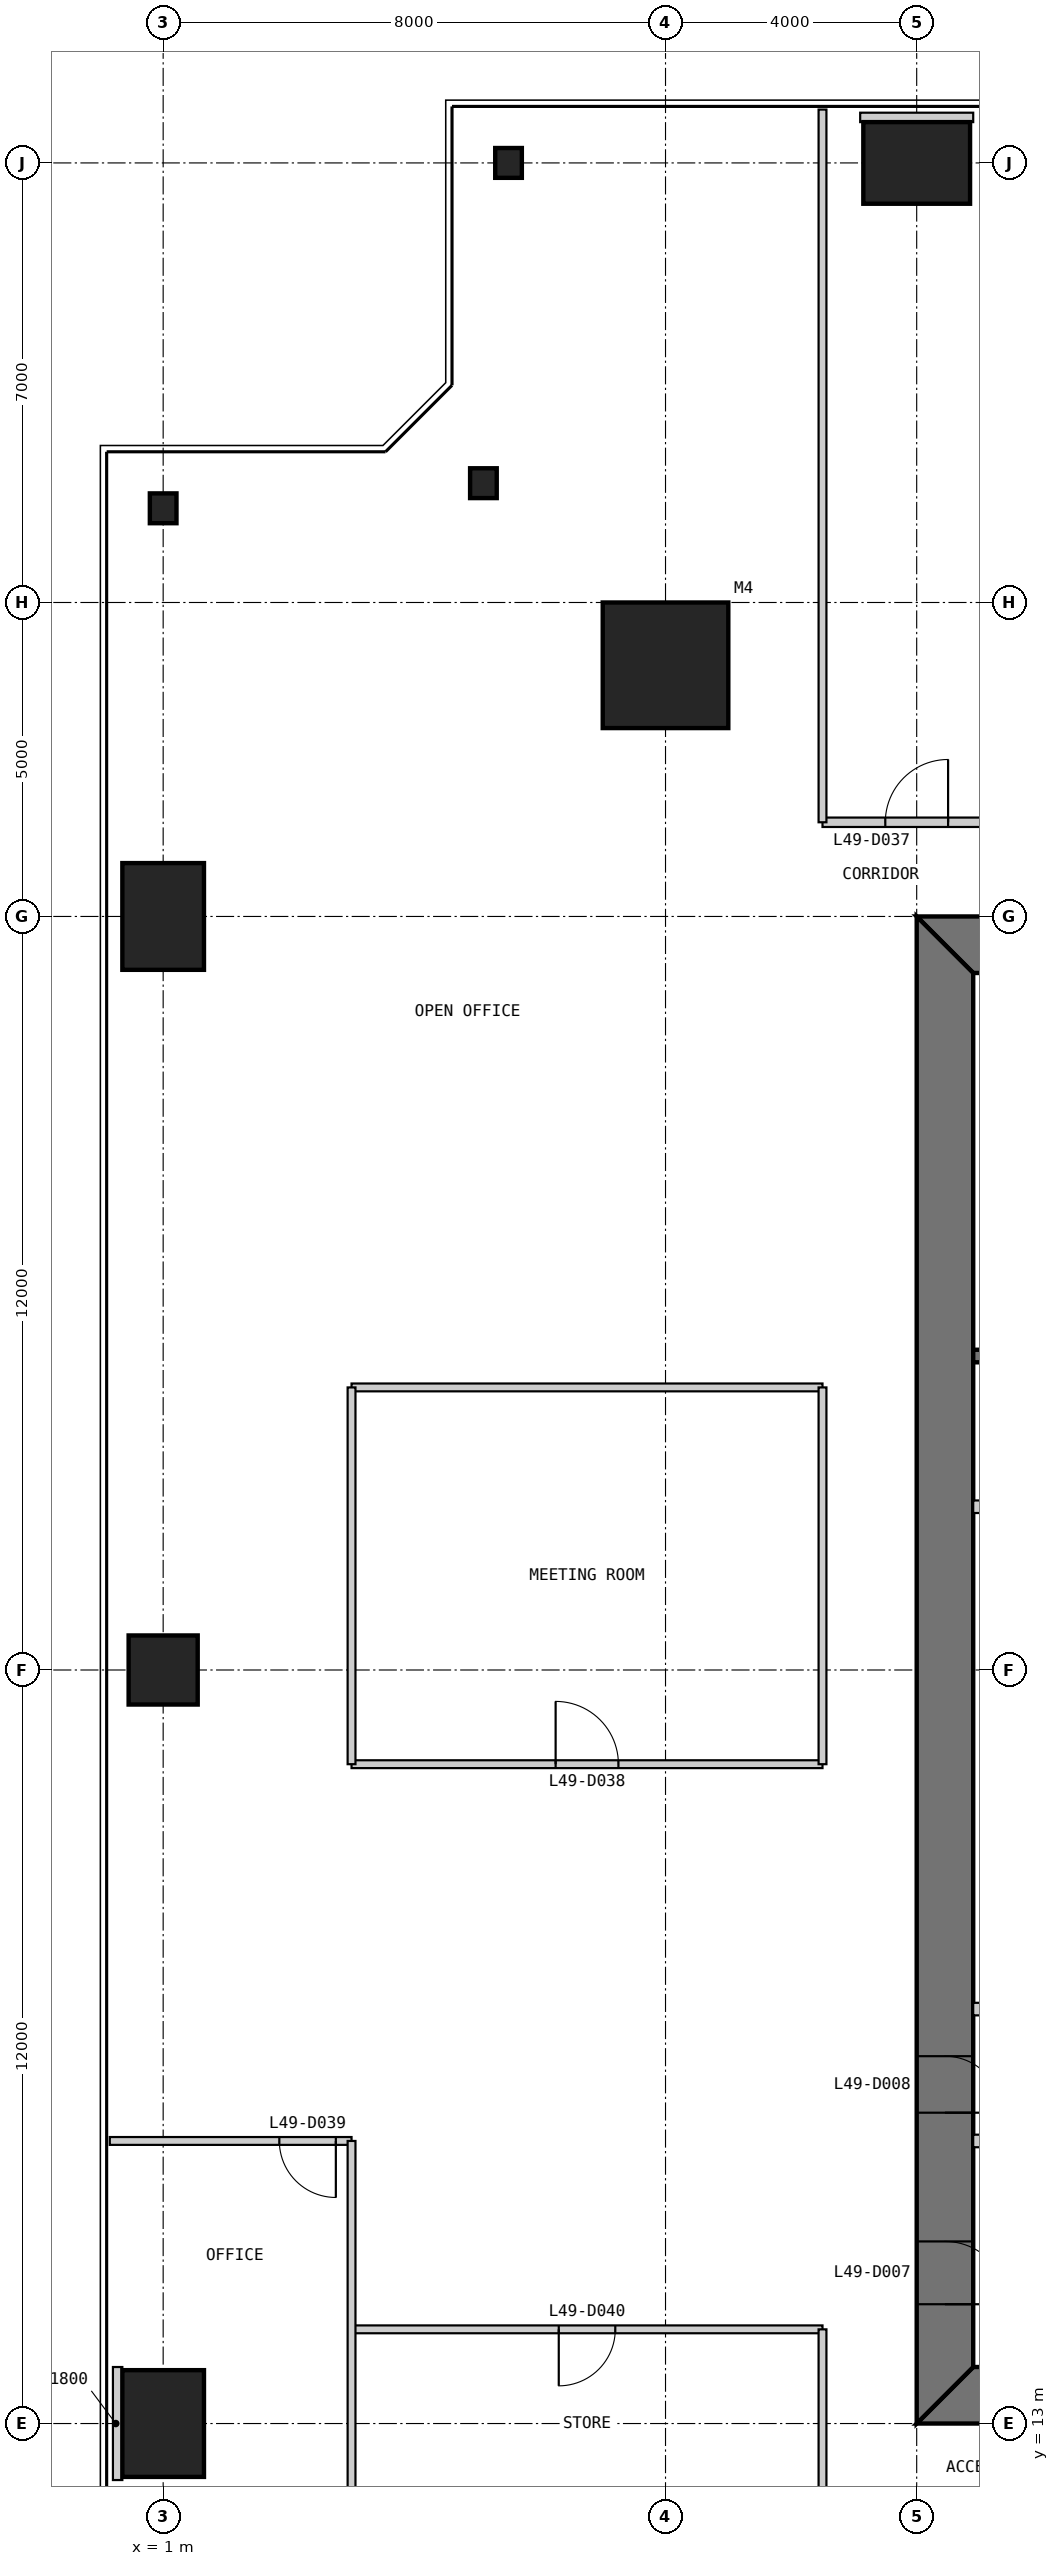
"""IFC4 building model, lengths in metres.
Left out: names, types, materials, properties, quantities, classifications, styles, units other than length and angle.
Written with IfcOpenShell. Run it as: python <this file> out.ifc"""

import sys

from ifc_helpers import new_model, si_unit, direction, frame, frame_2d, origin, origin_2d, place, context, subcontext, project, spatial, polyline, rectangle, i_section, outline, extrude, element, fill, save


model = new_model("IFC4")
c1 = context("Model", 3, precision=1e-05, world=origin(), true_north=direction((0.0, 1.0)))
c2 = subcontext(c1, "Body", "Model", "MODEL_VIEW")
j1 = project(units=[si_unit("LENGTHUNIT", "METRE"), si_unit("PLANEANGLEUNIT", "RADIAN")], contexts=[c1])
p1 = place(None, origin())
s1 = spatial("IfcSite", under=j1, at=p1, CompositionType="ELEMENT")
p2 = place(p1, origin())
s2 = spatial("IfcBuilding", under=s1, at=p2, CompositionType="ELEMENT")
p3 = place(p2, frame((0.0, 0.0, 209.8)))
s3 = spatial("IfcBuildingStorey", under=s2, at=p3, CompositionType="ELEMENT", Elevation=209.8)
p4 = place(p3, frame((9.0, 41.0, 0.0), z_axis=(0.0, 0.0, 1.0), x_axis=(1.0, 0.0, 0.0)))
e1 = element("IfcColumn", 1, at=p4, inside=s3, PredefinedType="COLUMN", context=c2, shape_type="SweptSolid", body=[
    extrude(rectangle(XDim=2.0, YDim=2.0, at=origin_2d()), origin(), (0.0, 0.0, 1.0), 4.0),
])
p5 = place(p3, frame((13.0, 49.0, 0.0), z_axis=(0.0, 0.0, 1.0), x_axis=(1.0, 0.0, 0.0)))
e2 = element("IfcColumn", 2, at=p5, inside=s3, PredefinedType="COLUMN", context=c2, shape_type="SweptSolid", body=[
    extrude(rectangle(XDim=1.7, YDim=1.3, at=origin_2d()), origin(), (0.0, 0.0, 1.0), 4.0),
])
for number, where, z_axis, x_axis in (
    (3, (6.5, 49.0, 0.0), (0.0, 0.0, 1.0), (1.0, 0.0, 0.0)),
    (4, (6.1, 43.9, 0.0), (0.0, 0.0, 1.0), (1.0, 0.0, 0.0)),
    (5, (1.0, 43.5, 0.0), (0.0, 0.0, 1.0), (1.0, 0.0, 0.0)),
):
    element("IfcColumn", number, at=place(p3, frame(where, z_axis=z_axis, x_axis=x_axis)), inside=s3, PredefinedType="COLUMN", context=c2, shape_type="SweptSolid", body=[
        extrude(i_section(OverallWidth=0.424, OverallDepth=0.475, WebThickness=0.048, FlangeThickness=0.077, at=origin_2d()), origin(), (0.0, 0.0, 1.0), 4.0),
    ])
p6 = place(p3, frame((1.0, 37.0, 0.0), z_axis=(0.0, 0.0, 1.0), x_axis=(1.0, 0.0, 0.0)))
e6 = element("IfcColumn", 6, at=p6, inside=s3, PredefinedType="COLUMN", context=c2, shape_type="SweptSolid", body=[
    extrude(rectangle(XDim=1.3, YDim=1.7, at=origin_2d()), origin(), (0.0, 0.0, 1.0), 4.0),
])
p7 = place(p3, frame((1.0, 25.0, 0.0), z_axis=(0.0, 0.0, 1.0), x_axis=(1.0, 0.0, 0.0)))
e7 = element("IfcColumn", 7, at=p7, inside=s3, PredefinedType="COLUMN", context=c2, shape_type="SweptSolid", body=[
    extrude(rectangle(XDim=1.1, YDim=1.1, at=origin_2d()), origin(), (0.0, 0.0, 1.0), 4.0),
])
p8 = place(p3, frame((1.0, 13.0, 0.0), z_axis=(0.0, 0.0, 1.0), x_axis=(1.0, 0.0, 0.0)))
e8 = element("IfcColumn", 8, at=p8, inside=s3, PredefinedType="COLUMN", context=c2, shape_type="SweptSolid", body=[
    extrude(rectangle(XDim=1.3, YDim=1.7, at=origin_2d()), origin(), (0.0, 0.0, 1.0), 4.0),
])
p9 = place(p3, frame((13.0, 13.45, 0.0), z_axis=(0.0, 0.0, 1.0), x_axis=(1.0, 0.0, 0.0)))
e9 = element("IfcWall", 9, at=p9, inside=s3, PredefinedType="SHEAR", context=c2, shape_type="SweptSolid", body=[
    extrude(outline(polyline([(0.0, -0.45), (24.0, -0.45), (23.1, 0.45), (0.9, 0.45), (0.0, -0.45)])), origin(), (0.0, 0.0, 1.0), 4.0),
])
p10 = place(p9, frame((4.9, 0.0, 0.0)))
e10 = element("IfcOpeningElement", 10, at=p10, cuts=e9, PredefinedType="OPENING", context=c2, shape_type="SweptSolid", body=[
    extrude(rectangle(XDim=1.0, YDim=2.2, at=frame_2d((0.5, 1.1))), frame((0.0, 0.46, 0.0), z_axis=(0.0, -1.0, 0.0), x_axis=(1.0, 0.0, 0.0)), (0.0, 0.0, 1.0), 0.92),
])
p11 = place(p9, frame((8.9, 0.0, 0.0)))
e11 = element("IfcOpeningElement", 11, at=p11, cuts=e9, PredefinedType="OPENING", context=c2, shape_type="SweptSolid", body=[
    extrude(rectangle(XDim=1.1, YDim=2.2, at=frame_2d((0.55, 1.1))), frame((0.0, 0.46, 0.0), z_axis=(0.0, -1.0, 0.0), x_axis=(1.0, 0.0, 0.0)), (0.0, 0.0, 1.0), 0.92),
])
p12 = place(p9, frame((15.05, 0.0, 0.0)))
e12 = element("IfcOpeningElement", 12, at=p12, cuts=e9, PredefinedType="OPENING", context=c2, shape_type="SweptSolid", body=[
    extrude(rectangle(XDim=0.9, YDim=2.2, at=frame_2d((0.45, 1.1))), frame((0.0, 0.46, 0.0), z_axis=(0.0, -1.0, 0.0), x_axis=(1.0, 0.0, 0.0)), (0.0, 0.0, 1.0), 0.92),
])
p13 = place(p9, frame((17.9, 0.0, 0.0)))
e13 = element("IfcOpeningElement", 13, at=p13, cuts=e9, PredefinedType="OPENING", context=c2, shape_type="SweptSolid", body=[
    extrude(rectangle(XDim=1.0, YDim=2.2, at=frame_2d((0.5, 1.1))), frame((0.0, 0.46, 0.0), z_axis=(0.0, -1.0, 0.0), x_axis=(1.0, 0.0, 0.0)), (0.0, 0.0, 1.0), 0.92),
])
p14 = place(p9, frame((21.4, 0.0, 0.0)))
e14 = element("IfcOpeningElement", 14, at=p14, cuts=e9, PredefinedType="OPENING", context=c2, shape_type="SweptSolid", body=[
    extrude(rectangle(XDim=1.0, YDim=2.2, at=frame_2d((0.5, 1.1))), frame((0.0, 0.46, 0.0), z_axis=(0.0, -1.0, 0.0), x_axis=(1.0, 0.0, 0.0)), (0.0, 0.0, 1.0), 0.92),
])
p15 = place(p3, frame((37.0, 36.55, 0.0), z_axis=(0.0, 0.0, 1.0), x_axis=(-1.0, 0.0, 0.0)))
e15 = element("IfcWall", 15, at=p15, inside=s3, PredefinedType="SHEAR", context=c2, shape_type="SweptSolid", body=[
    extrude(outline(polyline([(0.0, -0.45), (24.0, -0.45), (23.1, 0.45), (0.9, 0.45), (0.0, -0.45)])), origin(), (0.0, 0.0, 1.0), 4.0),
])
p16 = place(p15, frame((4.9, 0.0, 0.0)))
e16 = element("IfcOpeningElement", 16, at=p16, cuts=e15, PredefinedType="OPENING", context=c2, shape_type="SweptSolid", body=[
    extrude(rectangle(XDim=1.0, YDim=2.2, at=frame_2d((0.5, 1.1))), frame((0.0, 0.46, 0.0), z_axis=(0.0, -1.0, 0.0), x_axis=(1.0, 0.0, 0.0)), (0.0, 0.0, 1.0), 0.92),
])
p17 = place(p15, frame((8.9, 0.0, 0.0)))
e17 = element("IfcOpeningElement", 17, at=p17, cuts=e15, PredefinedType="OPENING", context=c2, shape_type="SweptSolid", body=[
    extrude(rectangle(XDim=1.1, YDim=2.2, at=frame_2d((0.55, 1.1))), frame((0.0, 0.46, 0.0), z_axis=(0.0, -1.0, 0.0), x_axis=(1.0, 0.0, 0.0)), (0.0, 0.0, 1.0), 0.92),
])
p18 = place(p15, frame((15.05, 0.0, 0.0)))
e18 = element("IfcOpeningElement", 18, at=p18, cuts=e15, PredefinedType="OPENING", context=c2, shape_type="SweptSolid", body=[
    extrude(rectangle(XDim=0.9, YDim=2.2, at=frame_2d((0.45, 1.1))), frame((0.0, 0.46, 0.0), z_axis=(0.0, -1.0, 0.0), x_axis=(1.0, 0.0, 0.0)), (0.0, 0.0, 1.0), 0.92),
])
p19 = place(p15, frame((17.9, 0.0, 0.0)))
e19 = element("IfcOpeningElement", 19, at=p19, cuts=e15, PredefinedType="OPENING", context=c2, shape_type="SweptSolid", body=[
    extrude(rectangle(XDim=1.0, YDim=2.2, at=frame_2d((0.5, 1.1))), frame((0.0, 0.46, 0.0), z_axis=(0.0, -1.0, 0.0), x_axis=(1.0, 0.0, 0.0)), (0.0, 0.0, 1.0), 0.92),
])
p20 = place(p15, frame((21.4, 0.0, 0.0)))
e20 = element("IfcOpeningElement", 20, at=p20, cuts=e15, PredefinedType="OPENING", context=c2, shape_type="SweptSolid", body=[
    extrude(rectangle(XDim=1.0, YDim=2.2, at=frame_2d((0.5, 1.1))), frame((0.0, 0.46, 0.0), z_axis=(0.0, -1.0, 0.0), x_axis=(1.0, 0.0, 0.0)), (0.0, 0.0, 1.0), 0.92),
])
p21 = place(p3, frame((13.45, 36.1, 0.0), z_axis=(0.0, 0.0, 1.0), x_axis=(0.0, -1.0, 0.0)))
e21 = element("IfcWall", 21, at=p21, inside=s3, PredefinedType="SHEAR", context=c2, shape_type="SweptSolid", body=[
    extrude(outline(polyline([(-0.9, -0.45), (23.1, -0.45), (22.2, 0.45), (0.0, 0.45), (-0.9, -0.45)])), origin(), (0.0, 0.0, 1.0), 4.0),
])
p22 = place(p21, frame((20.2, 0.0, 0.0)))
e22 = element("IfcOpeningElement", 22, at=p22, cuts=e21, PredefinedType="OPENING", context=c2, shape_type="SweptSolid", body=[
    extrude(rectangle(XDim=1.0, YDim=2.2, at=frame_2d((0.5, 1.1))), frame((0.0, 0.46, 0.0), z_axis=(0.0, -1.0, 0.0), x_axis=(1.0, 0.0, 0.0)), (0.0, 0.0, 1.0), 0.92),
])
p23 = place(p21, frame((17.25, 0.0, 0.0)))
e23 = element("IfcOpeningElement", 23, at=p23, cuts=e21, PredefinedType="OPENING", context=c2, shape_type="SweptSolid", body=[
    extrude(rectangle(XDim=0.9, YDim=2.2, at=frame_2d((0.45, 1.1))), frame((0.0, 0.46, 0.0), z_axis=(0.0, -1.0, 0.0), x_axis=(1.0, 0.0, 0.0)), (0.0, 0.0, 1.0), 0.92),
])
for number, where, z_axis, x_axis in (
    (24, (13.9, 17.5, 0.0), (0.0, 0.0, 1.0), (1.0, 0.0, 0.0)),
    (25, (13.9, 19.6, 0.0), (0.0, 0.0, 1.0), (1.0, 0.0, 0.0)),
    (26, (13.9, 27.6, 0.0), (0.0, 0.0, 1.0), (1.0, 0.0, 0.0)),
):
    element("IfcWall", number, at=place(p3, frame(where, z_axis=z_axis, x_axis=x_axis)), inside=s3, PredefinedType="PARTITIONING", context=c2, shape_type="SweptSolid", body=[
        extrude(rectangle(XDim=2.8, YDim=0.2, at=frame_2d((1.4, 0.0))), origin(), (0.0, 0.0, 1.0), 3.8),
    ])
p24 = place(p3, frame((29.7, 30.0, 0.0), z_axis=(0.0, 0.0, 1.0), x_axis=(-1.0, 0.0, 0.0)))
e27 = element("IfcWall", 27, at=p24, inside=s3, PredefinedType="SOLIDWALL", context=c2, shape_type="SweptSolid", body=[
    extrude(rectangle(XDim=15.8, YDim=0.2, at=frame_2d((7.9, 0.0))), origin(), (0.0, 0.0, 1.0), 3.8),
])
p25 = place(p3, frame((38.5, 38.5, 0.0), z_axis=(0.0, 0.0, 1.0), x_axis=(-1.0, 0.0, 0.0)))
e28 = element("IfcWall", 28, at=p25, inside=s3, PredefinedType="PARTITIONING", context=c2, shape_type="SweptSolid", body=[
    extrude(rectangle(XDim=27.0, YDim=0.15, at=frame_2d((13.5, 0.0))), origin(), (0.0, 0.0, 1.0), 3.85),
])
p26 = place(p25, frame((13.0, 0.0, 0.0)))
e29 = element("IfcOpeningElement", 29, at=p26, cuts=e28, PredefinedType="OPENING", context=c2, shape_type="SweptSolid", body=[
    extrude(rectangle(XDim=1.0, YDim=2.2, at=frame_2d((0.5, 1.1))), frame((0.0, 0.085, 0.0), z_axis=(0.0, -1.0, 0.0), x_axis=(1.0, 0.0, 0.0)), (0.0, 0.0, 1.0), 0.17),
])
p27 = place(p25, frame((4.0, 0.0, 0.0)))
e30 = element("IfcOpeningElement", 30, at=p27, cuts=e28, PredefinedType="OPENING", context=c2, shape_type="SweptSolid", body=[
    extrude(rectangle(XDim=1.0, YDim=2.2, at=frame_2d((0.5, 1.1))), frame((0.0, 0.085, 0.0), z_axis=(0.0, -1.0, 0.0), x_axis=(1.0, 0.0, 0.0)), (0.0, 0.0, 1.0), 0.17),
])
p28 = place(p25, frame((22.0, 0.0, 0.0)))
e31 = element("IfcOpeningElement", 31, at=p28, cuts=e28, PredefinedType="OPENING", context=c2, shape_type="SweptSolid", body=[
    extrude(rectangle(XDim=1.0, YDim=2.2, at=frame_2d((0.5, 1.1))), frame((0.0, 0.085, 0.0), z_axis=(0.0, -1.0, 0.0), x_axis=(1.0, 0.0, 0.0)), (0.0, 0.0, 1.0), 0.17),
])
p29 = place(p25, frame((25.0, 0.0, 0.0)))
e32 = element("IfcOpeningElement", 32, at=p29, cuts=e28, PredefinedType="OPENING", context=c2, shape_type="SweptSolid", body=[
    extrude(rectangle(XDim=1.0, YDim=2.2, at=frame_2d((0.5, 1.1))), frame((0.0, 0.085, 0.0), z_axis=(0.0, -1.0, 0.0), x_axis=(1.0, 0.0, 0.0)), (0.0, 0.0, 1.0), 0.17),
])
p30 = place(p3, frame((11.5, 49.85, 0.0), z_axis=(0.0, 0.0, 1.0), x_axis=(0.0, -1.0, 0.0)))
e33 = element("IfcWall", 33, at=p30, inside=s3, PredefinedType="PARTITIONING", context=c2, shape_type="SweptSolid", body=[
    extrude(rectangle(XDim=11.35, YDim=0.125, at=frame_2d((5.675, 0.0))), origin(), (0.0, 0.0, 1.0), 3.85),
])
p31 = place(p3, frame((4.0, 29.5, 0.0), z_axis=(0.0, 0.0, 1.0), x_axis=(1.0, 0.0, 0.0)))
e34 = element("IfcWall", 34, at=p31, inside=s3, PredefinedType="PARTITIONING", context=c2, shape_type="SweptSolid", body=[
    extrude(rectangle(XDim=7.5, YDim=0.125, at=frame_2d((3.75, 0.0))), origin(), (0.0, 0.0, 1.0), 3.85),
])
p32 = place(p3, frame((4.0, 23.5, 0.0), z_axis=(0.0, 0.0, 1.0), x_axis=(1.0, 0.0, 0.0)))
e35 = element("IfcWall", 35, at=p32, inside=s3, PredefinedType="PARTITIONING", context=c2, shape_type="SweptSolid", body=[
    extrude(rectangle(XDim=7.5, YDim=0.125, at=frame_2d((3.75, 0.0))), origin(), (0.0, 0.0, 1.0), 3.85),
])
p33 = place(p32, frame((3.25, 0.0, 0.0)))
e36 = element("IfcOpeningElement", 36, at=p33, cuts=e35, PredefinedType="OPENING", context=c2, shape_type="SweptSolid", body=[
    extrude(rectangle(XDim=1.0, YDim=2.2, at=frame_2d((0.5, 1.1))), frame((0.0, 0.073, 0.0), z_axis=(0.0, -1.0, 0.0), x_axis=(1.0, 0.0, 0.0)), (0.0, 0.0, 1.0), 0.145),
])
p34 = place(p3, frame((0.15, 17.5, 0.0), z_axis=(0.0, 0.0, 1.0), x_axis=(1.0, 0.0, 0.0)))
e37 = element("IfcWall", 37, at=p34, inside=s3, PredefinedType="PARTITIONING", context=c2, shape_type="SweptSolid", body=[
    extrude(rectangle(XDim=3.85, YDim=0.125, at=frame_2d((1.925, 0.0))), origin(), (0.0, 0.0, 1.0), 3.85),
])
p35 = place(p34, frame((2.7, 0.0, 0.0)))
e38 = element("IfcOpeningElement", 38, at=p35, cuts=e37, PredefinedType="OPENING", context=c2, shape_type="SweptSolid", body=[
    extrude(rectangle(XDim=0.9, YDim=2.2, at=frame_2d((0.45, 1.1))), frame((0.0, 0.073, 0.0), z_axis=(0.0, -1.0, 0.0), x_axis=(1.0, 0.0, 0.0)), (0.0, 0.0, 1.0), 0.145),
])
p36 = place(p3, frame((4.0, 14.5, 0.0), z_axis=(0.0, 0.0, 1.0), x_axis=(1.0, 0.0, 0.0)))
e39 = element("IfcWall", 39, at=p36, inside=s3, PredefinedType="PARTITIONING", context=c2, shape_type="SweptSolid", body=[
    extrude(rectangle(XDim=7.5, YDim=0.125, at=frame_2d((3.75, 0.0))), origin(), (0.0, 0.0, 1.0), 3.85),
])
p37 = place(p36, frame((3.3, 0.0, 0.0)))
e40 = element("IfcOpeningElement", 40, at=p37, cuts=e39, PredefinedType="OPENING", context=c2, shape_type="SweptSolid", body=[
    extrude(rectangle(XDim=0.9, YDim=2.2, at=frame_2d((0.45, 1.1))), frame((0.0, 0.073, 0.0), z_axis=(0.0, -1.0, 0.0), x_axis=(1.0, 0.0, 0.0)), (0.0, 0.0, 1.0), 0.145),
])
for number, where, z_axis, x_axis in (
    (41, (4.0, 29.5, 0.0), (0.0, 0.0, 1.0), (0.0, -1.0, 0.0)),
    (42, (4.0, 17.5, 0.0), (0.0, 0.0, 1.0), (0.0, -1.0, 0.0)),
):
    element("IfcWall", number, at=place(p3, frame(where, z_axis=z_axis, x_axis=x_axis)), inside=s3, PredefinedType="PARTITIONING", context=c2, shape_type="SweptSolid", body=[
        extrude(rectangle(XDim=6.0, YDim=0.125, at=frame_2d((3.0, 0.0))), origin(), (0.0, 0.0, 1.0), 3.238),
    ])
p38 = place(p3, frame((11.5, 29.5, 0.0), z_axis=(0.0, 0.0, 1.0), x_axis=(0.0, -1.0, 0.0)))
e43 = element("IfcWall", 43, at=p38, inside=s3, PredefinedType="PARTITIONING", context=c2, shape_type="SweptSolid", body=[
    extrude(rectangle(XDim=6.0, YDim=0.125, at=frame_2d((3.0, 0.0))), origin(), (0.0, 0.0, 1.0), 3.85),
])
p39 = place(p3, frame((11.5, 14.5, 0.0), z_axis=(0.0, 0.0, 1.0), x_axis=(0.0, -1.0, 0.0)))
e44 = element("IfcWall", 44, at=p39, inside=s3, PredefinedType="PARTITIONING", context=c2, shape_type="SweptSolid", body=[
    extrude(rectangle(XDim=3.0, YDim=0.125, at=frame_2d((1.5, 0.0))), origin(), (0.0, 0.0, 1.0), 3.85),
])
for number, where, z_axis, x_axis in (
    (45, (13.0, 49.8, 0.0), (0.0, 0.0, 1.0), (0.0, -1.0, 0.0)),
    (46, (0.2, 13.0, 0.0), (0.0, 0.0, 1.0), (1.0, 0.0, 0.0)),
):
    element("IfcWall", number, at=place(p3, frame(where, z_axis=z_axis, x_axis=x_axis)), inside=s3, PredefinedType="PARTITIONING", context=c2, shape_type="SweptSolid", body=[
        extrude(rectangle(XDim=0.15, YDim=1.8, at=frame_2d((0.075, 0.0))), origin(), (0.0, 0.0, 1.0), 3.85),
    ])
p40 = place(p22, origin())
e47 = element("IfcDoor", 47, at=p40, inside=s3, OperationType="SINGLE_SWING_RIGHT", PredefinedType="DOOR", context=c2, shape_type="SweptSolid", body=[
    extrude(rectangle(XDim=1.0, YDim=2.2, at=frame_2d((0.5, 1.1))), frame((0.0, 0.025, 0.0), z_axis=(0.0, -1.0, 0.0), x_axis=(1.0, 0.0, 0.0)), (0.0, 0.0, 1.0), 0.05),
    extrude(outline(polyline([(0.0, 0.0), (0.04, 0.0), (0.04, 2.16), (0.96, 2.16), (0.96, 0.0), (1.0, 0.0), (1.0, 2.2), (0.0, 2.2), (0.0, 0.0)])), frame((0.0, 0.3, 0.0), z_axis=(0.0, -1.0, 0.0), x_axis=(1.0, 0.0, 0.0)), (0.0, 0.0, 1.0), 0.6),
])
fill(e22, e47)
p41 = place(p23, origin())
e48 = element("IfcDoor", 48, at=p41, inside=s3, OperationType="SINGLE_SWING_RIGHT", PredefinedType="DOOR", context=c2, shape_type="SweptSolid", body=[
    extrude(rectangle(XDim=0.9, YDim=2.2, at=frame_2d((0.45, 1.1))), frame((0.0, 0.025, 0.0), z_axis=(0.0, -1.0, 0.0), x_axis=(1.0, 0.0, 0.0)), (0.0, 0.0, 1.0), 0.05),
    extrude(outline(polyline([(0.0, 0.0), (0.04, 0.0), (0.04, 2.16), (0.86, 2.16), (0.86, 0.0), (0.9, 0.0), (0.9, 2.2), (0.0, 2.2), (0.0, 0.0)])), frame((0.0, 0.3, 0.0), z_axis=(0.0, -1.0, 0.0), x_axis=(1.0, 0.0, 0.0)), (0.0, 0.0, 1.0), 0.6),
])
fill(e23, e48)
p42 = place(p29, frame((1.0, 0.0, 0.0), z_axis=(0.0, 0.0, 1.0), x_axis=(-1.0, 0.0, 0.0)))
e49 = element("IfcDoor", 49, at=p42, inside=s3, OperationType="SINGLE_SWING_RIGHT", PredefinedType="DOOR", context=c2, shape_type="SweptSolid", body=[
    extrude(rectangle(XDim=1.0, YDim=2.2, at=frame_2d((0.5, 1.1))), frame((0.0, 0.025, 0.0), z_axis=(0.0, -1.0, 0.0), x_axis=(1.0, 0.0, 0.0)), (0.0, 0.0, 1.0), 0.05),
])
fill(e32, e49)
p43 = place(p33, origin())
e50 = element("IfcDoor", 50, at=p43, inside=s3, OperationType="SINGLE_SWING_LEFT", PredefinedType="DOOR", context=c2, shape_type="SweptSolid", body=[
    extrude(rectangle(XDim=1.0, YDim=2.2, at=frame_2d((0.5, 1.1))), frame((0.0, 0.025, 0.0), z_axis=(0.0, -1.0, 0.0), x_axis=(1.0, 0.0, 0.0)), (0.0, 0.0, 1.0), 0.05),
])
fill(e36, e50)
p44 = place(p35, frame((0.9, 0.0, 0.0), z_axis=(0.0, 0.0, 1.0), x_axis=(-1.0, 0.0, 0.0)))
e51 = element("IfcDoor", 51, at=p44, inside=s3, OperationType="SINGLE_SWING_LEFT", PredefinedType="DOOR", context=c2, shape_type="SweptSolid", body=[
    extrude(rectangle(XDim=0.9, YDim=2.2, at=frame_2d((0.45, 1.1))), frame((0.0, 0.025, 0.0), z_axis=(0.0, -1.0, 0.0), x_axis=(1.0, 0.0, 0.0)), (0.0, 0.0, 1.0), 0.05),
])
fill(e38, e51)
p45 = place(p37, frame((0.9, 0.0, 0.0), z_axis=(0.0, 0.0, 1.0), x_axis=(-1.0, 0.0, 0.0)))
e52 = element("IfcDoor", 52, at=p45, inside=s3, OperationType="SINGLE_SWING_RIGHT", PredefinedType="DOOR", context=c2, shape_type="SweptSolid", body=[
    extrude(rectangle(XDim=0.9, YDim=2.2, at=frame_2d((0.45, 1.1))), frame((0.0, 0.025, 0.0), z_axis=(0.0, -1.0, 0.0), x_axis=(1.0, 0.0, 0.0)), (0.0, 0.0, 1.0), 0.05),
])
fill(e40, e52)
save(model, sys.argv[1])
